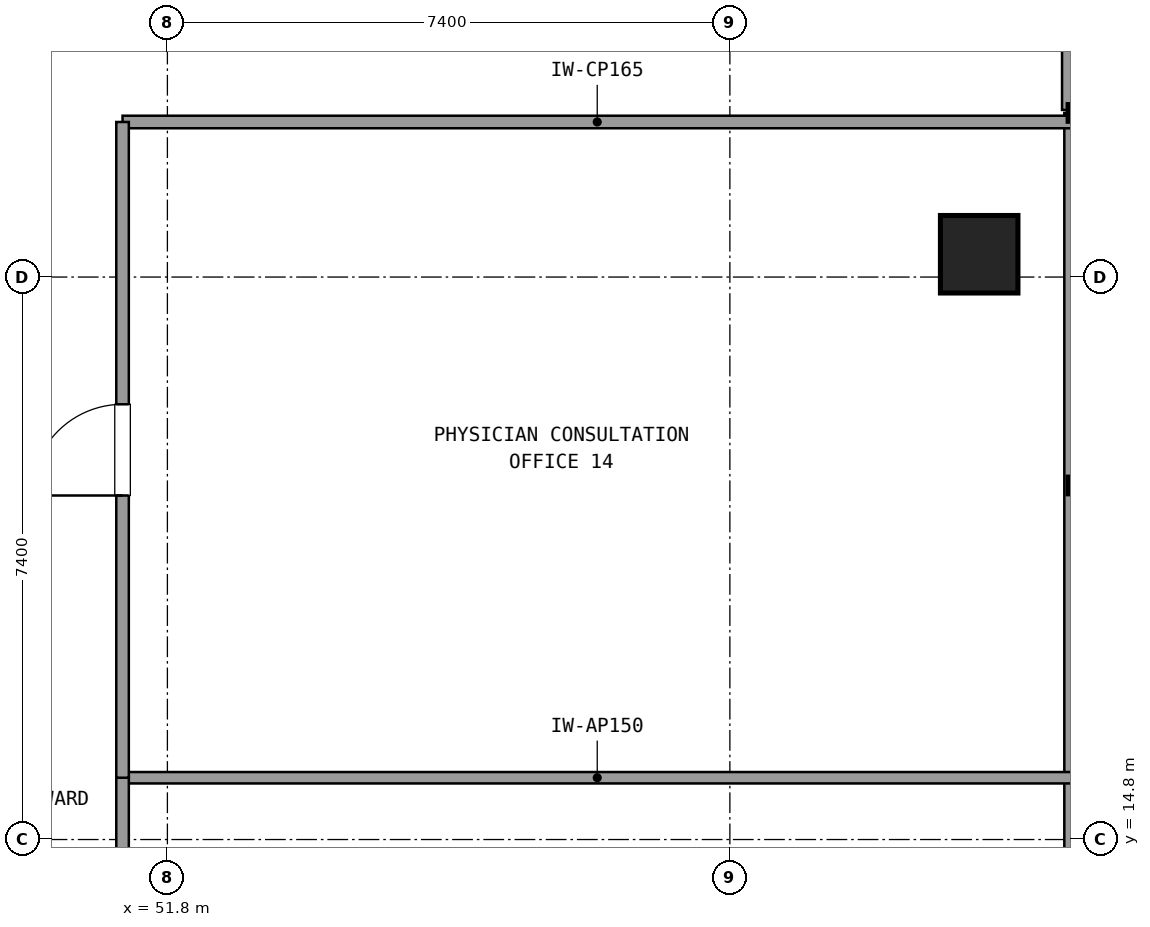
"""IFC4 building model, lengths in metres.
Left out: names, types, materials, properties, quantities, classifications, styles, units other than length and angle.
Written with IfcOpenShell. Run it as: python <this file> out.ifc"""

import sys

from ifc_helpers import new_model, si_unit, direction, frame, frame_2d, origin, origin_2d, place, context, subcontext, project, spatial, rectangle, extrude, element, fill, save


model = new_model("IFC4")
c1 = context("Model", 3, precision=1e-05, world=origin(), true_north=direction((0.0, 1.0)))
c2 = subcontext(c1, "Body", "Model", "MODEL_VIEW")
j1 = project(units=[si_unit("LENGTHUNIT", "METRE"), si_unit("PLANEANGLEUNIT", "RADIAN")], contexts=[c1])
p1 = place(None, origin())
s1 = spatial("IfcSite", under=j1, at=p1, CompositionType="ELEMENT")
p2 = place(p1, origin())
s2 = spatial("IfcBuilding", under=s1, at=p2, CompositionType="ELEMENT")
p3 = place(p2, frame((0.0, 0.0, 81.18)))
s3 = spatial("IfcBuildingStorey", under=s2, at=p3, CompositionType="ELEMENT", Elevation=81.18)
p4 = place(p3, frame((62.48, 22.5, 0.0), z_axis=(0.0, 0.0, 1.0), x_axis=(1.0, 0.0, 0.0)))
e1 = element("IfcColumn", 1, at=p4, inside=s3, PredefinedType="COLUMN", context=c2, shape_type="SweptSolid", body=[
    extrude(rectangle(XDim=1.02, YDim=1.02, at=origin_2d()), origin(), (0.0, 0.0, 1.0), 3.6),
])
p5 = place(p3, frame((63.72, 24.399, 0.0), z_axis=(0.0, 0.0, 1.0), x_axis=(0.0, 1.0, 0.0)))
e2 = element("IfcWall", 2, at=p5, inside=s3, PredefinedType="SOLIDWALL", context=c2, shape_type="SweptSolid", body=[
    extrude(rectangle(XDim=3.0, YDim=0.3, at=frame_2d((1.5, 0.0))), origin(), (0.0, 0.0, 1.0), 2.67),
])
p6 = place(p5, frame((0.9, 0.0, 0.0)))
e3 = element("IfcOpeningElement", 3, at=p6, cuts=e2, PredefinedType="OPENING", context=c2, shape_type="SweptSolid", body=[
    extrude(rectangle(XDim=1.2, YDim=2.2, at=frame_2d((0.6, 1.1))), frame((0.0, 0.16, 0.0), z_axis=(0.0, -1.0, 0.0), x_axis=(1.0, 0.0, 0.0)), (0.0, 0.0, 1.0), 0.32),
])
p7 = place(p3, frame((63.72, 9.655, 0.0), z_axis=(0.0, 0.0, 1.0), x_axis=(0.0, 1.0, 0.0)))
e4 = element("IfcWall", 4, at=p7, inside=s3, PredefinedType="SOLIDWALL", context=c2, shape_type="SweptSolid", body=[
    extrude(rectangle(XDim=14.704, YDim=0.24, at=frame_2d((7.352, 0.0))), origin(), (0.0, 0.0, 1.0), 0.85),
])
p8 = place(p3, frame((51.21, 24.24, 0.0), z_axis=(0.0, 0.0, 1.0), x_axis=(1.0, 0.0, 0.0)))
e5 = element("IfcWall", 5, at=p8, inside=s3, PredefinedType="PARTITIONING", context=c2, shape_type="SweptSolid", body=[
    extrude(rectangle(XDim=12.49, YDim=0.165, at=frame_2d((6.245, 0.0))), origin(), (0.0, 0.0, 1.0), 2.61),
])
p9 = place(p3, frame((51.21, 15.613, 0.0), z_axis=(0.0, 0.0, 1.0), x_axis=(1.0, 0.0, 0.0)))
e6 = element("IfcWall", 6, at=p9, inside=s3, PredefinedType="PARTITIONING", context=c2, shape_type="SweptSolid", body=[
    extrude(rectangle(XDim=12.49, YDim=0.15, at=frame_2d((6.245, 0.0))), origin(), (0.0, 0.0, 1.0), 2.61),
])
p10 = place(p3, frame((51.21, 3.7, 0.0), z_axis=(0.0, 0.0, 1.0), x_axis=(0.0, 1.0, 0.0)))
e7 = element("IfcWall", 7, at=p10, inside=s3, PredefinedType="PARTITIONING", context=c2, shape_type="SweptSolid", body=[
    extrude(rectangle(XDim=11.913, YDim=0.165, at=frame_2d((5.957, 0.0))), origin(), (0.0, 0.0, 1.0), 2.61),
])
p11 = place(p10, frame((5.357, 0.0, 0.0)))
e8 = element("IfcOpeningElement", 8, at=p11, cuts=e7, PredefinedType="OPENING", context=c2, shape_type="SweptSolid", body=[
    extrude(rectangle(XDim=1.2, YDim=2.15, at=frame_2d((0.6, 1.075))), frame((0.0, 0.093, 0.0), z_axis=(0.0, -1.0, 0.0), x_axis=(1.0, 0.0, 0.0)), (0.0, 0.0, 1.0), 0.185),
])
p12 = place(p3, frame((51.21, 15.613, 0.0), z_axis=(0.0, 0.0, 1.0), x_axis=(0.0, 1.0, 0.0)))
e9 = element("IfcWall", 9, at=p12, inside=s3, PredefinedType="PARTITIONING", context=c2, shape_type="SweptSolid", body=[
    extrude(rectangle(XDim=8.627, YDim=0.165, at=frame_2d((4.313, 0.0))), origin(), (0.0, 0.0, 1.0), 2.61),
])
p13 = place(p12, frame((3.713, 0.0, 0.0)))
e10 = element("IfcOpeningElement", 10, at=p13, cuts=e9, PredefinedType="OPENING", context=c2, shape_type="SweptSolid", body=[
    extrude(rectangle(XDim=1.2, YDim=2.15, at=frame_2d((0.6, 1.075))), frame((0.0, 0.093, 0.0), z_axis=(0.0, -1.0, 0.0), x_axis=(1.0, 0.0, 0.0)), (0.0, 0.0, 1.0), 0.185),
])
p14 = place(p13, origin())
e11 = element("IfcDoor", 11, at=p14, inside=s3, OperationType="SINGLE_SWING_LEFT", PredefinedType="DOOR", context=c2, shape_type="SweptSolid", body=[
    extrude(rectangle(XDim=1.2, YDim=2.15, at=frame_2d((0.6, 1.075))), frame((0.0, 0.025, 0.0), z_axis=(0.0, -1.0, 0.0), x_axis=(1.0, 0.0, 0.0)), (0.0, 0.0, 1.0), 0.05),
])
fill(e10, e11)
save(model, sys.argv[1])
